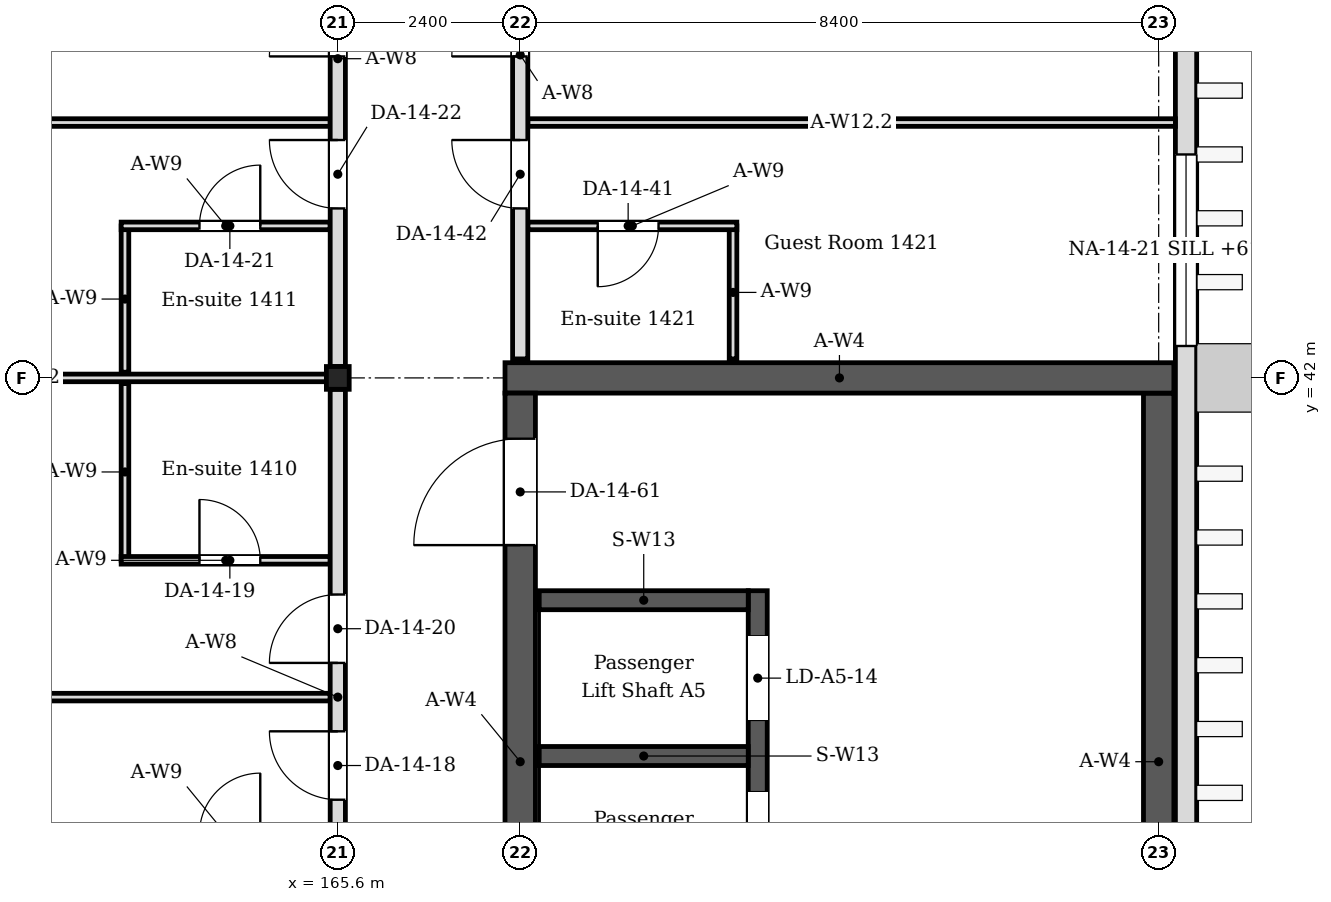
"""IFC4 building model, lengths in metres.
Left out: names, types, materials, properties, quantities, classifications, styles, units other than length and angle.
Written with IfcOpenShell. Run it as: python <this file> out.ifc"""

import sys

from ifc_helpers import new_model, si_unit, direction, frame, frame_2d, origin, origin_2d, place, context, subcontext, project, spatial, rectangle, i_section, extrude, element, fill, save


model = new_model("IFC4")
c1 = context("Model", 3, precision=1e-05, world=origin(), true_north=direction((0.0, 1.0)))
c2 = subcontext(c1, "Body", "Model", "MODEL_VIEW")
j1 = project(units=[si_unit("LENGTHUNIT", "METRE"), si_unit("PLANEANGLEUNIT", "RADIAN")], contexts=[c1])
p1 = place(None, origin())
s1 = spatial("IfcSite", under=j1, at=p1, CompositionType="ELEMENT")
p2 = place(p1, origin())
s2 = spatial("IfcBuilding", under=s1, at=p2, CompositionType="ELEMENT")
p3 = place(p2, frame((0.0, 0.0, 60.6)))
s3 = spatial("IfcBuildingStorey", under=s2, at=p3, CompositionType="ELEMENT", Elevation=60.6)
p4 = place(p3, frame((165.6, 42.0, 0.0), z_axis=(0.0, 0.0, 1.0), x_axis=(1.0, 0.0, 0.0)))
e1 = element("IfcColumn", 1, at=p4, inside=s3, PredefinedType="COLUMN", context=c2, shape_type="SweptSolid", body=[
    extrude(i_section(OverallWidth=0.3, OverallDepth=0.3, WebThickness=0.01, FlangeThickness=0.015, FilletRadius=0.013, at=origin_2d()), origin(), (0.0, 0.0, 1.0), 4.2),
])
p5 = place(p3, frame((167.8, 42.0, 0.0), z_axis=(0.0, 0.0, 1.0), x_axis=(1.0, 0.0, 0.0)))
e2 = element("IfcWall", 2, at=p5, inside=s3, PredefinedType="SOLIDWALL", context=c2, shape_type="SweptSolid", body=[
    extrude(rectangle(XDim=8.8, YDim=0.4, at=frame_2d((4.4, 0.0))), origin(), (0.0, 0.0, 1.0), 4.05),
])
p6 = place(p3, frame((168.0, 25.4, 0.0), z_axis=(0.0, 0.0, 1.0), x_axis=(0.0, 1.0, 0.0)))
e3 = element("IfcWall", 3, at=p6, inside=s3, PredefinedType="SOLIDWALL", context=c2, shape_type="SweptSolid", body=[
    extrude(rectangle(XDim=16.4, YDim=0.4, at=frame_2d((8.2, 0.0))), origin(), (0.0, 0.0, 1.0), 4.05),
])
p7 = place(p6, frame((1.0, 0.0, 0.0)))
e4 = element("IfcOpeningElement", 4, at=p7, cuts=e3, PredefinedType="OPENING", context=c2, shape_type="SweptSolid", body=[
    extrude(rectangle(XDim=1.0, YDim=2.1, at=frame_2d((0.5, 1.05))), frame((0.0, 0.21, 0.0), z_axis=(0.0, -1.0, 0.0), x_axis=(1.0, 0.0, 0.0)), (0.0, 0.0, 1.0), 0.42),
])
p8 = place(p6, frame((14.4, 0.0, 0.0)))
e5 = element("IfcOpeningElement", 5, at=p8, cuts=e3, PredefinedType="OPENING", context=c2, shape_type="SweptSolid", body=[
    extrude(rectangle(XDim=1.4, YDim=2.1, at=frame_2d((0.7, 1.05))), frame((0.0, 0.21, 0.0), z_axis=(0.0, -1.0, 0.0), x_axis=(1.0, 0.0, 0.0)), (0.0, 0.0, 1.0), 0.42),
])
p9 = place(p3, frame((176.4, 25.4, 0.0), z_axis=(0.0, 0.0, 1.0), x_axis=(0.0, 1.0, 0.0)))
e6 = element("IfcWall", 6, at=p9, inside=s3, PredefinedType="SOLIDWALL", context=c2, shape_type="SweptSolid", body=[
    extrude(rectangle(XDim=16.4, YDim=0.4, at=frame_2d((8.2, 0.0))), origin(), (0.0, 0.0, 1.0), 4.05),
])
p10 = place(p3, frame((176.76, -0.22, 0.0), z_axis=(0.0, 0.0, 1.0), x_axis=(0.0, 1.0, 0.0)))
e7 = element("IfcWall", 7, at=p10, inside=s3, PredefinedType="SOLIDWALL", context=c2, shape_type="SweptSolid", body=[
    extrude(rectangle(XDim=67.64, YDim=0.28, at=frame_2d((33.82, 0.0))), origin(), (0.0, 0.0, 1.0), 4.05),
])
p11 = place(p10, frame((9.88, 0.0, 0.45)))
e8 = element("IfcOpeningElement", 8, at=p11, cuts=e7, PredefinedType="OPENING", context=c2, shape_type="SweptSolid", body=[
    extrude(rectangle(XDim=2.52, YDim=2.1, at=frame_2d((1.26, 1.05))), frame((0.0, 0.15, 0.0), z_axis=(0.0, -1.0, 0.0), x_axis=(1.0, 0.0, 0.0)), (0.0, 0.0, 1.0), 0.3),
])
p12 = place(p10, frame((14.08, 0.0, 0.6)))
e9 = element("IfcOpeningElement", 9, at=p12, cuts=e7, PredefinedType="OPENING", context=c2, shape_type="SweptSolid", body=[
    extrude(rectangle(XDim=2.52, YDim=2.4, at=frame_2d((1.26, 1.2))), frame((0.0, 0.15, 0.0), z_axis=(0.0, -1.0, 0.0), x_axis=(1.0, 0.0, 0.0)), (0.0, 0.0, 1.0), 0.3),
])
p13 = place(p10, frame((17.86, 0.0, 0.6)))
e10 = element("IfcOpeningElement", 10, at=p13, cuts=e7, PredefinedType="OPENING", context=c2, shape_type="SweptSolid", body=[
    extrude(rectangle(XDim=2.52, YDim=2.4, at=frame_2d((1.26, 1.2))), frame((0.0, 0.15, 0.0), z_axis=(0.0, -1.0, 0.0), x_axis=(1.0, 0.0, 0.0)), (0.0, 0.0, 1.0), 0.3),
])
p14 = place(p10, frame((22.06, 0.0, 0.6)))
e11 = element("IfcOpeningElement", 11, at=p14, cuts=e7, PredefinedType="OPENING", context=c2, shape_type="SweptSolid", body=[
    extrude(rectangle(XDim=2.52, YDim=2.4, at=frame_2d((1.26, 1.2))), frame((0.0, 0.15, 0.0), z_axis=(0.0, -1.0, 0.0), x_axis=(1.0, 0.0, 0.0)), (0.0, 0.0, 1.0), 0.3),
])
p15 = place(p10, frame((42.64, 0.0, 0.6)))
e12 = element("IfcOpeningElement", 12, at=p15, cuts=e7, PredefinedType="OPENING", context=c2, shape_type="SweptSolid", body=[
    extrude(rectangle(XDim=2.52, YDim=2.4, at=frame_2d((1.26, 1.2))), frame((0.0, 0.15, 0.0), z_axis=(0.0, -1.0, 0.0), x_axis=(1.0, 0.0, 0.0)), (0.0, 0.0, 1.0), 0.3),
])
p16 = place(p10, frame((46.84, 0.0, 0.6)))
e13 = element("IfcOpeningElement", 13, at=p16, cuts=e7, PredefinedType="OPENING", context=c2, shape_type="SweptSolid", body=[
    extrude(rectangle(XDim=2.52, YDim=2.4, at=frame_2d((1.26, 1.2))), frame((0.0, 0.15, 0.0), z_axis=(0.0, -1.0, 0.0), x_axis=(1.0, 0.0, 0.0)), (0.0, 0.0, 1.0), 0.3),
])
p17 = place(p10, frame((51.04, 0.0, 0.6)))
e14 = element("IfcOpeningElement", 14, at=p17, cuts=e7, PredefinedType="OPENING", context=c2, shape_type="SweptSolid", body=[
    extrude(rectangle(XDim=2.52, YDim=2.4, at=frame_2d((1.26, 1.2))), frame((0.0, 0.15, 0.0), z_axis=(0.0, -1.0, 0.0), x_axis=(1.0, 0.0, 0.0)), (0.0, 0.0, 1.0), 0.3),
])
p18 = place(p10, frame((55.24, 0.0, 0.6)))
e15 = element("IfcOpeningElement", 15, at=p18, cuts=e7, PredefinedType="OPENING", context=c2, shape_type="SweptSolid", body=[
    extrude(rectangle(XDim=2.52, YDim=2.4, at=frame_2d((1.26, 1.2))), frame((0.0, 0.15, 0.0), z_axis=(0.0, -1.0, 0.0), x_axis=(1.0, 0.0, 0.0)), (0.0, 0.0, 1.0), 0.3),
])
p19 = place(p3, frame((162.8, 39.6, 0.0), z_axis=(0.0, 0.0, 1.0), x_axis=(0.0, 1.0, 0.0)))
e16 = element("IfcWall", 16, at=p19, inside=s3, PredefinedType="PARTITIONING", context=c2, shape_type="SweptSolid", body=[
    extrude(rectangle(XDim=2.325, YDim=0.1, at=frame_2d((1.163, 0.0))), origin(), (0.0, 0.0, 1.0), 4.05),
])
p20 = place(p3, frame((162.75, 39.6, 0.0), z_axis=(0.0, 0.0, 1.0), x_axis=(1.0, 0.0, 0.0)))
e17 = element("IfcWall", 17, at=p20, inside=s3, PredefinedType="PARTITIONING", context=c2, shape_type="SweptSolid", body=[
    extrude(rectangle(XDim=2.75, YDim=0.1, at=frame_2d((1.375, 0.0))), origin(), (0.0, 0.0, 1.0), 4.05),
])
p21 = place(p20, frame((1.03, 0.0, 0.0)))
e18 = element("IfcOpeningElement", 18, at=p21, cuts=e17, PredefinedType="OPENING", context=c2, shape_type="SweptSolid", body=[
    extrude(rectangle(XDim=0.8, YDim=2.1, at=frame_2d((0.4, 1.05))), frame((0.0, 0.06, 0.0), z_axis=(0.0, -1.0, 0.0), x_axis=(1.0, 0.0, 0.0)), (0.0, 0.0, 1.0), 0.12),
])
p22 = place(p3, frame((162.8, 42.075, 0.0), z_axis=(0.0, 0.0, 1.0), x_axis=(0.0, 1.0, 0.0)))
e19 = element("IfcWall", 19, at=p22, inside=s3, PredefinedType="PARTITIONING", context=c2, shape_type="SweptSolid", body=[
    extrude(rectangle(XDim=1.925, YDim=0.1, at=frame_2d((0.962, 0.0))), origin(), (0.0, 0.0, 1.0), 4.05),
])
p23 = place(p3, frame((162.75, 44.0, 0.0), z_axis=(0.0, 0.0, 1.0), x_axis=(1.0, 0.0, 0.0)))
e20 = element("IfcWall", 20, at=p23, inside=s3, PredefinedType="PARTITIONING", context=c2, shape_type="SweptSolid", body=[
    extrude(rectangle(XDim=2.75, YDim=0.1, at=frame_2d((1.375, 0.0))), origin(), (0.0, 0.0, 1.0), 4.05),
])
p24 = place(p23, frame((1.03, 0.0, 0.0)))
e21 = element("IfcOpeningElement", 21, at=p24, cuts=e20, PredefinedType="OPENING", context=c2, shape_type="SweptSolid", body=[
    extrude(rectangle(XDim=0.8, YDim=2.1, at=frame_2d((0.4, 1.05))), frame((0.0, 0.06, 0.0), z_axis=(0.0, -1.0, 0.0), x_axis=(1.0, 0.0, 0.0)), (0.0, 0.0, 1.0), 0.12),
])
p25 = place(p3, frame((170.8, 42.25, 0.0), z_axis=(0.0, 0.0, 1.0), x_axis=(0.0, 1.0, 0.0)))
e22 = element("IfcWall", 22, at=p25, inside=s3, PredefinedType="PARTITIONING", context=c2, shape_type="SweptSolid", body=[
    extrude(rectangle(XDim=1.75, YDim=0.1, at=frame_2d((0.875, 0.0))), origin(), (0.0, 0.0, 1.0), 4.05),
])
p26 = place(p3, frame((170.85, 44.0, 0.0), z_axis=(0.0, 0.0, 1.0), x_axis=(-1.0, 0.0, 0.0)))
e23 = element("IfcWall", 23, at=p26, inside=s3, PredefinedType="PARTITIONING", context=c2, shape_type="SweptSolid", body=[
    extrude(rectangle(XDim=2.75, YDim=0.1, at=frame_2d((1.375, 0.0))), origin(), (0.0, 0.0, 1.0), 4.05),
])
p27 = place(p26, frame((1.03, 0.0, 0.0)))
e24 = element("IfcOpeningElement", 24, at=p27, cuts=e23, PredefinedType="OPENING", context=c2, shape_type="SweptSolid", body=[
    extrude(rectangle(XDim=0.8, YDim=2.1, at=frame_2d((0.4, 1.05))), frame((0.0, 0.06, 0.0), z_axis=(0.0, -1.0, 0.0), x_axis=(1.0, 0.0, 0.0)), (0.0, 0.0, 1.0), 0.12),
])
p28 = place(p3, frame((157.35, 42.0, 0.0), z_axis=(0.0, 0.0, 1.0), x_axis=(1.0, 0.0, 0.0)))
e25 = element("IfcWall", 25, at=p28, inside=s3, PredefinedType="PARTITIONING", context=c2, shape_type="SweptSolid", body=[
    extrude(rectangle(XDim=8.1, YDim=0.1, at=frame_2d((4.05, 0.0))), origin(), (0.0, 0.0, 1.0), 3.55),
])
for number, where, z_axis, x_axis in (
    (26, (156.98, 37.8, 0.0), (0.0, 0.0, 1.0), (1.0, 0.0, 0.0)),
    (27, (156.98, 45.36, 0.0), (0.0, 0.0, 1.0), (1.0, 0.0, 0.0)),
    (28, (168.1, 45.36, 0.0), (0.0, 0.0, 1.0), (1.0, 0.0, 0.0)),
):
    element("IfcWall", number, at=place(p3, frame(where, z_axis=z_axis, x_axis=x_axis)), inside=s3, PredefinedType="PARTITIONING", context=c2, shape_type="SweptSolid", body=[
        extrude(rectangle(XDim=8.52, YDim=0.1, at=frame_2d((4.26, 0.0))), origin(), (0.0, 0.0, 1.0), 3.55),
    ])
p29 = place(p3, frame((165.6, 33.75, 0.0), z_axis=(0.0, 0.0, 1.0), x_axis=(0.0, 1.0, 0.0)))
e29 = element("IfcWall", 29, at=p29, inside=s3, PredefinedType="PARTITIONING", context=c2, shape_type="SweptSolid", body=[
    extrude(rectangle(XDim=8.1, YDim=0.2, at=frame_2d((4.05, 0.0))), origin(), (0.0, 0.0, 1.0), 3.45),
])
p30 = place(p29, frame((2.7, 0.0, 0.0)))
e30 = element("IfcOpeningElement", 30, at=p30, cuts=e29, PredefinedType="OPENING", context=c2, shape_type="SweptSolid", body=[
    extrude(rectangle(XDim=0.9, YDim=2.1, at=frame_2d((0.45, 1.05))), frame((0.0, 0.11, 0.0), z_axis=(0.0, -1.0, 0.0), x_axis=(1.0, 0.0, 0.0)), (0.0, 0.0, 1.0), 0.22),
])
p31 = place(p29, frame((4.5, 0.0, 0.0)))
e31 = element("IfcOpeningElement", 31, at=p31, cuts=e29, PredefinedType="OPENING", context=c2, shape_type="SweptSolid", body=[
    extrude(rectangle(XDim=0.9, YDim=2.1, at=frame_2d((0.45, 1.05))), frame((0.0, 0.11, 0.0), z_axis=(0.0, -1.0, 0.0), x_axis=(1.0, 0.0, 0.0)), (0.0, 0.0, 1.0), 0.22),
])
p32 = place(p3, frame((165.6, 42.15, 0.0), z_axis=(0.0, 0.0, 1.0), x_axis=(0.0, 1.0, 0.0)))
e32 = element("IfcWall", 32, at=p32, inside=s3, PredefinedType="PARTITIONING", context=c2, shape_type="SweptSolid", body=[
    extrude(rectangle(XDim=8.1, YDim=0.2, at=frame_2d((4.05, 0.0))), origin(), (0.0, 0.0, 1.0), 3.45),
])
p33 = place(p32, frame((2.08, 0.0, 0.0)))
e33 = element("IfcOpeningElement", 33, at=p33, cuts=e32, PredefinedType="OPENING", context=c2, shape_type="SweptSolid", body=[
    extrude(rectangle(XDim=0.9, YDim=2.1, at=frame_2d((0.45, 1.05))), frame((0.0, 0.11, 0.0), z_axis=(0.0, -1.0, 0.0), x_axis=(1.0, 0.0, 0.0)), (0.0, 0.0, 1.0), 0.22),
])
p34 = place(p32, frame((4.08, 0.0, 0.0)))
e34 = element("IfcOpeningElement", 34, at=p34, cuts=e32, PredefinedType="OPENING", context=c2, shape_type="SweptSolid", body=[
    extrude(rectangle(XDim=0.9, YDim=2.1, at=frame_2d((0.45, 1.05))), frame((0.0, 0.11, 0.0), z_axis=(0.0, -1.0, 0.0), x_axis=(1.0, 0.0, 0.0)), (0.0, 0.0, 1.0), 0.22),
])
p35 = place(p3, frame((168.0, 42.25, 0.0), z_axis=(0.0, 0.0, 1.0), x_axis=(0.0, 1.0, 0.0)))
e35 = element("IfcWall", 35, at=p35, inside=s3, PredefinedType="PARTITIONING", context=c2, shape_type="SweptSolid", body=[
    extrude(rectangle(XDim=8.0, YDim=0.2, at=frame_2d((4.0, 0.0))), origin(), (0.0, 0.0, 1.0), 3.45),
])
p36 = place(p35, frame((1.98, 0.0, 0.0)))
e36 = element("IfcOpeningElement", 36, at=p36, cuts=e35, PredefinedType="OPENING", context=c2, shape_type="SweptSolid", body=[
    extrude(rectangle(XDim=0.9, YDim=2.1, at=frame_2d((0.45, 1.05))), frame((0.0, 0.11, 0.0), z_axis=(0.0, -1.0, 0.0), x_axis=(1.0, 0.0, 0.0)), (0.0, 0.0, 1.0), 0.22),
])
p37 = place(p35, frame((3.98, 0.0, 0.0)))
e37 = element("IfcOpeningElement", 37, at=p37, cuts=e35, PredefinedType="OPENING", context=c2, shape_type="SweptSolid", body=[
    extrude(rectangle(XDim=0.9, YDim=2.1, at=frame_2d((0.45, 1.05))), frame((0.0, 0.11, 0.0), z_axis=(0.0, -1.0, 0.0), x_axis=(1.0, 0.0, 0.0)), (0.0, 0.0, 1.0), 0.22),
])
p38 = place(p3, frame((171.125, 28.3, 0.0), z_axis=(0.0, 0.0, 1.0), x_axis=(0.0, 1.0, 0.0)))
e38 = element("IfcWall", 38, at=p38, inside=s3, PredefinedType="SOLIDWALL", context=c2, shape_type="SweptSolid", body=[
    extrude(rectangle(XDim=10.9, YDim=0.25, at=frame_2d((5.45, 0.0))), origin(), (0.0, 0.0, 1.0), 4.05),
])
p39 = place(p38, frame((0.8, 0.0, 0.0)))
e39 = element("IfcOpeningElement", 39, at=p39, cuts=e38, PredefinedType="OPENING", context=c2, shape_type="SweptSolid", body=[
    extrude(rectangle(XDim=1.1, YDim=2.1, at=frame_2d((0.55, 1.05))), frame((0.0, 0.135, 0.0), z_axis=(0.0, -1.0, 0.0), x_axis=(1.0, 0.0, 0.0)), (0.0, 0.0, 1.0), 0.27),
])
p40 = place(p38, frame((3.05, 0.0, 0.0)))
e40 = element("IfcOpeningElement", 40, at=p40, cuts=e38, PredefinedType="OPENING", context=c2, shape_type="SweptSolid", body=[
    extrude(rectangle(XDim=1.1, YDim=2.1, at=frame_2d((0.55, 1.05))), frame((0.0, 0.135, 0.0), z_axis=(0.0, -1.0, 0.0), x_axis=(1.0, 0.0, 0.0)), (0.0, 0.0, 1.0), 0.27),
])
p41 = place(p38, frame((5.1, 0.0, 0.0)))
e41 = element("IfcOpeningElement", 41, at=p41, cuts=e38, PredefinedType="OPENING", context=c2, shape_type="SweptSolid", body=[
    extrude(rectangle(XDim=1.1, YDim=2.1, at=frame_2d((0.55, 1.05))), frame((0.0, 0.135, 0.0), z_axis=(0.0, -1.0, 0.0), x_axis=(1.0, 0.0, 0.0)), (0.0, 0.0, 1.0), 0.27),
])
p42 = place(p38, frame((7.15, 0.0, 0.0)))
e42 = element("IfcOpeningElement", 42, at=p42, cuts=e38, PredefinedType="OPENING", context=c2, shape_type="SweptSolid", body=[
    extrude(rectangle(XDim=1.1, YDim=2.1, at=frame_2d((0.55, 1.05))), frame((0.0, 0.135, 0.0), z_axis=(0.0, -1.0, 0.0), x_axis=(1.0, 0.0, 0.0)), (0.0, 0.0, 1.0), 0.27),
])
p43 = place(p38, frame((9.2, 0.0, 0.0)))
e43 = element("IfcOpeningElement", 43, at=p43, cuts=e38, PredefinedType="OPENING", context=c2, shape_type="SweptSolid", body=[
    extrude(rectangle(XDim=1.1, YDim=2.1, at=frame_2d((0.55, 1.05))), frame((0.0, 0.135, 0.0), z_axis=(0.0, -1.0, 0.0), x_axis=(1.0, 0.0, 0.0)), (0.0, 0.0, 1.0), 0.27),
])
for number, where, z_axis, x_axis in (
    (44, (168.25, 37.025, 0.0), (0.0, 0.0, 1.0), (1.0, 0.0, 0.0)),
    (45, (168.25, 39.075, 0.0), (0.0, 0.0, 1.0), (1.0, 0.0, 0.0)),
):
    element("IfcWall", number, at=place(p3, frame(where, z_axis=z_axis, x_axis=x_axis)), inside=s3, PredefinedType="SOLIDWALL", context=c2, shape_type="SweptSolid", body=[
        extrude(rectangle(XDim=2.75, YDim=0.25, at=frame_2d((1.375, 0.0))), origin(), (0.0, 0.0, 1.0), 4.05),
    ])
p44 = place(p15, origin())
e46 = element("IfcWindow", 46, at=p44, inside=s3, PartitioningType="SINGLE_PANEL", PredefinedType="WINDOW", context=c2, shape_type="SweptSolid", body=[
    extrude(rectangle(XDim=2.52, YDim=2.4, at=frame_2d((1.26, 1.2))), frame((0.0, 0.03, 0.0), z_axis=(0.0, -1.0, 0.0), x_axis=(1.0, 0.0, 0.0)), (0.0, 0.0, 1.0), 0.06),
])
fill(e12, e46)
p45 = place(p30, origin())
e47 = element("IfcDoor", 47, at=p45, inside=s3, OperationType="SINGLE_SWING_RIGHT", PredefinedType="DOOR", context=c2, shape_type="SweptSolid", body=[
    extrude(rectangle(XDim=0.9, YDim=2.1, at=frame_2d((0.45, 1.05))), frame((0.0, 0.025, 0.0), z_axis=(0.0, -1.0, 0.0), x_axis=(1.0, 0.0, 0.0)), (0.0, 0.0, 1.0), 0.05),
])
fill(e30, e47)
p46 = place(p21, origin())
e48 = element("IfcDoor", 48, at=p46, inside=s3, OperationType="SINGLE_SWING_LEFT", PredefinedType="DOOR", context=c2, shape_type="SweptSolid", body=[
    extrude(rectangle(XDim=0.8, YDim=2.1, at=frame_2d((0.4, 1.05))), frame((0.0, 0.025, 0.0), z_axis=(0.0, -1.0, 0.0), x_axis=(1.0, 0.0, 0.0)), (0.0, 0.0, 1.0), 0.05),
])
fill(e18, e48)
p47 = place(p31, origin())
e49 = element("IfcDoor", 49, at=p47, inside=s3, OperationType="SINGLE_SWING_LEFT", PredefinedType="DOOR", context=c2, shape_type="SweptSolid", body=[
    extrude(rectangle(XDim=0.9, YDim=2.1, at=frame_2d((0.45, 1.05))), frame((0.0, 0.025, 0.0), z_axis=(0.0, -1.0, 0.0), x_axis=(1.0, 0.0, 0.0)), (0.0, 0.0, 1.0), 0.05),
])
fill(e31, e49)
p48 = place(p24, origin())
e50 = element("IfcDoor", 50, at=p48, inside=s3, OperationType="SINGLE_SWING_RIGHT", PredefinedType="DOOR", context=c2, shape_type="SweptSolid", body=[
    extrude(rectangle(XDim=0.8, YDim=2.1, at=frame_2d((0.4, 1.05))), frame((0.0, 0.025, 0.0), z_axis=(0.0, -1.0, 0.0), x_axis=(1.0, 0.0, 0.0)), (0.0, 0.0, 1.0), 0.05),
])
fill(e21, e50)
p49 = place(p33, origin())
e51 = element("IfcDoor", 51, at=p49, inside=s3, OperationType="SINGLE_SWING_RIGHT", PredefinedType="DOOR", context=c2, shape_type="SweptSolid", body=[
    extrude(rectangle(XDim=0.9, YDim=2.1, at=frame_2d((0.45, 1.05))), frame((0.0, 0.025, 0.0), z_axis=(0.0, -1.0, 0.0), x_axis=(1.0, 0.0, 0.0)), (0.0, 0.0, 1.0), 0.05),
])
fill(e33, e51)
p50 = place(p34, origin())
e52 = element("IfcDoor", 52, at=p50, inside=s3, OperationType="SINGLE_SWING_LEFT", PredefinedType="DOOR", context=c2, shape_type="SweptSolid", body=[
    extrude(rectangle(XDim=0.9, YDim=2.1, at=frame_2d((0.45, 1.05))), frame((0.0, 0.025, 0.0), z_axis=(0.0, -1.0, 0.0), x_axis=(1.0, 0.0, 0.0)), (0.0, 0.0, 1.0), 0.05),
])
fill(e34, e52)
p51 = place(p27, origin())
e53 = element("IfcDoor", 53, at=p51, inside=s3, OperationType="SINGLE_SWING_RIGHT", PredefinedType="DOOR", context=c2, shape_type="SweptSolid", body=[
    extrude(rectangle(XDim=0.8, YDim=2.1, at=frame_2d((0.4, 1.05))), frame((0.0, 0.025, 0.0), z_axis=(0.0, -1.0, 0.0), x_axis=(1.0, 0.0, 0.0)), (0.0, 0.0, 1.0), 0.05),
])
fill(e24, e53)
p52 = place(p36, origin())
e54 = element("IfcDoor", 54, at=p52, inside=s3, OperationType="SINGLE_SWING_RIGHT", PredefinedType="DOOR", context=c2, shape_type="SweptSolid", body=[
    extrude(rectangle(XDim=0.9, YDim=2.1, at=frame_2d((0.45, 1.05))), frame((0.0, 0.025, 0.0), z_axis=(0.0, -1.0, 0.0), x_axis=(1.0, 0.0, 0.0)), (0.0, 0.0, 1.0), 0.05),
])
fill(e36, e54)
p53 = place(p37, origin())
e55 = element("IfcDoor", 55, at=p53, inside=s3, OperationType="SINGLE_SWING_LEFT", PredefinedType="DOOR", context=c2, shape_type="SweptSolid", body=[
    extrude(rectangle(XDim=0.9, YDim=2.1, at=frame_2d((0.45, 1.05))), frame((0.0, 0.025, 0.0), z_axis=(0.0, -1.0, 0.0), x_axis=(1.0, 0.0, 0.0)), (0.0, 0.0, 1.0), 0.05),
])
fill(e37, e55)
p54 = place(p42, origin())
e56 = element("IfcDoor", 56, at=p54, inside=s3, OperationType="SLIDING_TO_LEFT", PredefinedType="DOOR", context=c2, shape_type="SweptSolid", body=[
    extrude(rectangle(XDim=1.1, YDim=2.1, at=frame_2d((0.55, 1.05))), frame((0.0, 0.025, 0.0), z_axis=(0.0, -1.0, 0.0), x_axis=(1.0, 0.0, 0.0)), (0.0, 0.0, 1.0), 0.05),
])
fill(e42, e56)
p55 = place(p43, origin())
e57 = element("IfcDoor", 57, at=p55, inside=s3, OperationType="SLIDING_TO_LEFT", PredefinedType="DOOR", context=c2, shape_type="SweptSolid", body=[
    extrude(rectangle(XDim=1.1, YDim=2.1, at=frame_2d((0.55, 1.05))), frame((0.0, 0.025, 0.0), z_axis=(0.0, -1.0, 0.0), x_axis=(1.0, 0.0, 0.0)), (0.0, 0.0, 1.0), 0.05),
])
fill(e43, e57)
p56 = place(p8, origin())
e58 = element("IfcDoor", 58, at=p56, inside=s3, OperationType="DOUBLE_DOOR_DOUBLE_SWING", PredefinedType="DOOR", context=c2, shape_type="SweptSolid", body=[
    extrude(rectangle(XDim=1.4, YDim=2.1, at=frame_2d((0.7, 1.05))), frame((0.0, 0.025, 0.0), z_axis=(0.0, -1.0, 0.0), x_axis=(1.0, 0.0, 0.0)), (0.0, 0.0, 1.0), 0.05),
])
fill(e5, e58)
save(model, sys.argv[1])
